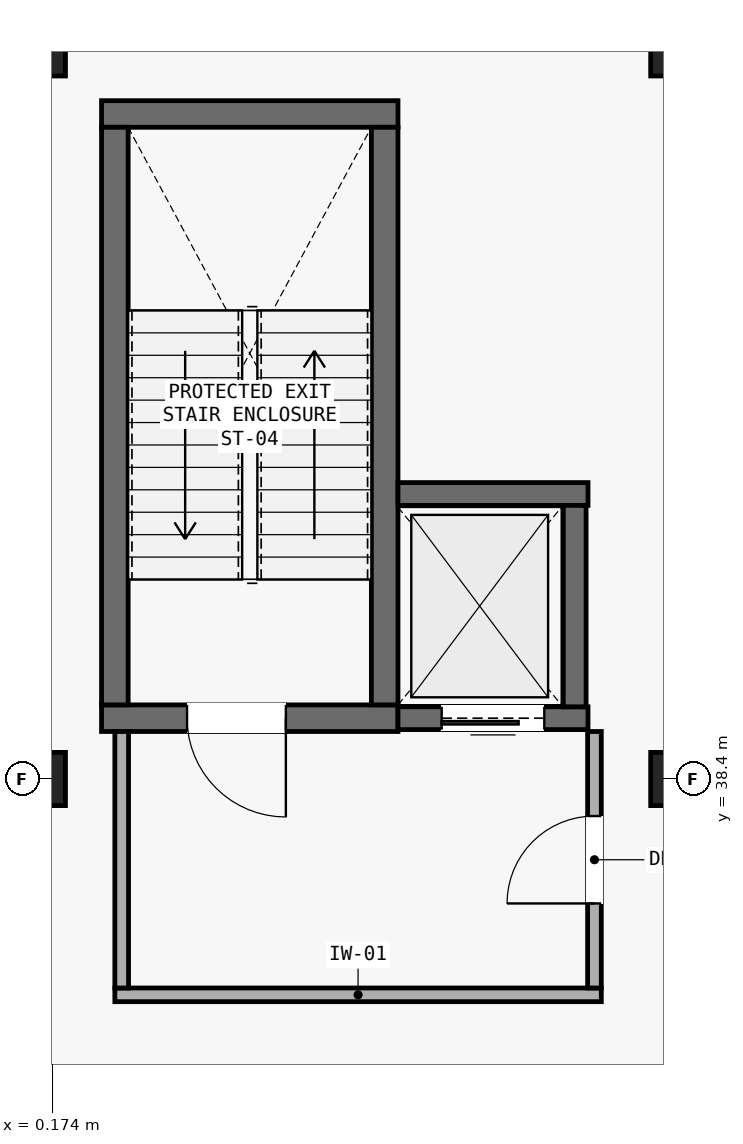
"""IFC4 building model, lengths in metres.
Left out: names, types, materials, properties, quantities, classifications, styles, units other than length and angle.
Written with IfcOpenShell. Run it as: python <this file> out.ifc"""

import sys

from ifc_helpers import new_model, si_unit, direction, frame, frame_2d, origin, origin_2d, place, context, subcontext, project, spatial, rectangle, extrude, element, fill, save


model = new_model("IFC4")
c1 = context("Model", 3, precision=1e-05, world=origin(), true_north=direction((0.0, 1.0)))
c2 = subcontext(c1, "Body", "Model", "MODEL_VIEW")
j1 = project(units=[si_unit("LENGTHUNIT", "METRE"), si_unit("PLANEANGLEUNIT", "RADIAN")], contexts=[c1])
p1 = place(None, origin())
s1 = spatial("IfcSite", under=j1, at=p1, CompositionType="ELEMENT")
p2 = place(p1, origin())
s2 = spatial("IfcBuilding", under=s1, at=p2, CompositionType="ELEMENT")
p3 = place(p2, frame((0.0, 0.0, -4.55)))
s3 = spatial("IfcBuildingStorey", under=s2, at=p3, CompositionType="ELEMENT", Elevation=-4.55)
for number, where, z_axis, x_axis in (
    (1, (0.0, 38.4, 0.0), (0.0, 0.0, 1.0), (1.0, 0.0, 0.0)),
    (2, (8.4, 38.4, 0.0), (0.0, 0.0, 1.0), (1.0, 0.0, 0.0)),
    (3, (0.0, 48.0, 0.0), (0.0, 0.0, 1.0), (1.0, 0.0, 0.0)),
    (4, (8.4, 48.0, 0.0), (0.0, 0.0, 1.0), (1.0, 0.0, 0.0)),
):
    element("IfcColumn", number, at=place(p3, frame(where, z_axis=z_axis, x_axis=x_axis)), inside=s3, PredefinedType="COLUMN", context=c2, shape_type="SweptSolid", body=[
        extrude(rectangle(XDim=0.7, YDim=0.7, at=origin_2d()), origin(), (0.0, 0.0, 1.0), 4.55),
    ])
p4 = place(p3, frame((0.825, 39.2, 0.0), z_axis=(0.0, 0.0, 1.0), x_axis=(1.0, 0.0, 0.0)))
e5 = element("IfcWall", 5, at=p4, inside=s3, PredefinedType="SHEAR", context=c2, shape_type="SweptSolid", body=[
    extrude(rectangle(XDim=3.9, YDim=0.35, at=frame_2d((1.95, 0.0))), origin(), (0.0, 0.0, 1.0), 4.28),
])
p5 = place(p4, frame((1.125, 0.0, 0.0)))
e6 = element("IfcOpeningElement", 6, at=p5, cuts=e5, PredefinedType="OPENING", context=c2, shape_type="SweptSolid", body=[
    extrude(rectangle(XDim=1.3, YDim=2.15, at=frame_2d((0.65, 1.075))), frame((0.0, 0.185, 0.0), z_axis=(0.0, -1.0, 0.0), x_axis=(1.0, 0.0, 0.0)), (0.0, 0.0, 1.0), 0.37),
])
p6 = place(p3, frame((0.825, 47.15, 0.0), z_axis=(0.0, 0.0, 1.0), x_axis=(1.0, 0.0, 0.0)))
e7 = element("IfcWall", 7, at=p6, inside=s3, PredefinedType="SHEAR", context=c2, shape_type="SweptSolid", body=[
    extrude(rectangle(XDim=3.9, YDim=0.35, at=frame_2d((1.95, 0.0))), origin(), (0.0, 0.0, 1.0), 4.28),
])
for number, where, z_axis, x_axis in (
    (8, (1.0, 39.375, 0.0), (0.0, 0.0, 1.0), (0.0, 1.0, 0.0)),
    (9, (4.55, 39.375, 0.0), (0.0, 0.0, 1.0), (0.0, 1.0, 0.0)),
):
    element("IfcWall", number, at=place(p3, frame(where, z_axis=z_axis, x_axis=x_axis)), inside=s3, PredefinedType="SHEAR", context=c2, shape_type="SweptSolid", body=[
        extrude(rectangle(XDim=7.6, YDim=0.35, at=frame_2d((3.8, 0.0))), origin(), (0.0, 0.0, 1.0), 4.28),
    ])
p7 = place(p3, frame((4.725, 39.2, 0.0), z_axis=(0.0, 0.0, 1.0), x_axis=(1.0, 0.0, 0.0)))
e10 = element("IfcWall", 10, at=p7, inside=s3, PredefinedType="SHEAR", context=c2, shape_type="SweptSolid", body=[
    extrude(rectangle(XDim=2.5, YDim=0.3, at=frame_2d((1.25, 0.0))), origin(), (0.0, 0.0, 1.0), 4.28),
])
p8 = place(p7, frame((0.575, 0.0, 0.0)))
e11 = element("IfcOpeningElement", 11, at=p8, cuts=e10, PredefinedType="OPENING", context=c2, shape_type="SweptSolid", body=[
    extrude(rectangle(XDim=1.35, YDim=2.15, at=frame_2d((0.675, 1.075))), frame((0.0, 0.16, 0.0), z_axis=(0.0, -1.0, 0.0), x_axis=(1.0, 0.0, 0.0)), (0.0, 0.0, 1.0), 0.32),
])
p9 = place(p3, frame((4.725, 42.15, 0.0), z_axis=(0.0, 0.0, 1.0), x_axis=(1.0, 0.0, 0.0)))
e12 = element("IfcWall", 12, at=p9, inside=s3, PredefinedType="SHEAR", context=c2, shape_type="SweptSolid", body=[
    extrude(rectangle(XDim=2.5, YDim=0.3, at=frame_2d((1.25, 0.0))), origin(), (0.0, 0.0, 1.0), 4.28),
])
p10 = place(p3, frame((7.05, 39.35, 0.0), z_axis=(0.0, 0.0, 1.0), x_axis=(0.0, 1.0, 0.0)))
e13 = element("IfcWall", 13, at=p10, inside=s3, PredefinedType="SHEAR", context=c2, shape_type="SweptSolid", body=[
    extrude(rectangle(XDim=2.65, YDim=0.3, at=frame_2d((1.325, 0.0))), origin(), (0.0, 0.0, 1.0), 4.28),
])
p11 = place(p3, frame((1.0, 35.56, 0.0), z_axis=(0.0, 0.0, 1.0), x_axis=(1.0, 0.0, 0.0)))
e14 = element("IfcWall", 14, at=p11, inside=s3, PredefinedType="PARTITIONING", context=c2, shape_type="SweptSolid", body=[
    extrude(rectangle(XDim=6.4, YDim=0.18, at=frame_2d((3.2, 0.0))), origin(), (0.0, 0.0, 1.0), 4.28),
])
p12 = place(p3, frame((1.09, 35.65, 0.0), z_axis=(0.0, 0.0, 1.0), x_axis=(0.0, 1.0, 0.0)))
e15 = element("IfcWall", 15, at=p12, inside=s3, PredefinedType="PARTITIONING", context=c2, shape_type="SweptSolid", body=[
    extrude(rectangle(XDim=3.375, YDim=0.18, at=frame_2d((1.688, 0.0))), origin(), (0.0, 0.0, 1.0), 4.28),
])
p13 = place(p3, frame((7.31, 35.65, 0.0), z_axis=(0.0, 0.0, 1.0), x_axis=(0.0, 1.0, 0.0)))
e16 = element("IfcWall", 16, at=p13, inside=s3, PredefinedType="PARTITIONING", context=c2, shape_type="SweptSolid", body=[
    extrude(rectangle(XDim=3.375, YDim=0.18, at=frame_2d((1.688, 0.0))), origin(), (0.0, 0.0, 1.0), 4.28),
])
p14 = place(p13, frame((1.113, 0.0, 0.0)))
e17 = element("IfcOpeningElement", 17, at=p14, cuts=e16, PredefinedType="OPENING", context=c2, shape_type="SweptSolid", body=[
    extrude(rectangle(XDim=1.15, YDim=2.15, at=frame_2d((0.575, 1.075))), frame((0.0, 0.1, 0.0), z_axis=(0.0, -1.0, 0.0), x_axis=(1.0, 0.0, 0.0)), (0.0, 0.0, 1.0), 0.2),
])
p15 = place(p5, frame((1.3, 0.0, 0.0), z_axis=(0.0, 0.0, 1.0), x_axis=(-1.0, 0.0, 0.0)))
e18 = element("IfcDoor", 18, at=p15, inside=s3, OperationType="SINGLE_SWING_RIGHT", PredefinedType="DOOR", context=c2, shape_type="SweptSolid", body=[
    extrude(rectangle(XDim=1.3, YDim=2.15, at=frame_2d((0.65, 1.075))), frame((0.0, 0.025, 0.0), z_axis=(0.0, -1.0, 0.0), x_axis=(1.0, 0.0, 0.0)), (0.0, 0.0, 1.0), 0.05),
])
fill(e6, e18)
p16 = place(p8, frame((1.35, 0.0, 0.0), z_axis=(0.0, 0.0, 1.0), x_axis=(-1.0, 0.0, 0.0)))
e19 = element("IfcDoor", 19, at=p16, inside=s3, OperationType="SLIDING_TO_RIGHT", PredefinedType="DOOR", context=c2, shape_type="SweptSolid", body=[
    extrude(rectangle(XDim=1.35, YDim=2.15, at=frame_2d((0.675, 1.075))), frame((0.0, 0.025, 0.0), z_axis=(0.0, -1.0, 0.0), x_axis=(1.0, 0.0, 0.0)), (0.0, 0.0, 1.0), 0.05),
])
fill(e11, e19)
p17 = place(p14, origin())
e20 = element("IfcDoor", 20, at=p17, inside=s3, OperationType="SINGLE_SWING_LEFT", PredefinedType="DOOR", context=c2, shape_type="SweptSolid", body=[
    extrude(rectangle(XDim=1.15, YDim=2.15, at=frame_2d((0.575, 1.075))), frame((0.0, 0.025, 0.0), z_axis=(0.0, -1.0, 0.0), x_axis=(1.0, 0.0, 0.0)), (0.0, 0.0, 1.0), 0.05),
])
fill(e17, e20)
save(model, sys.argv[1])
